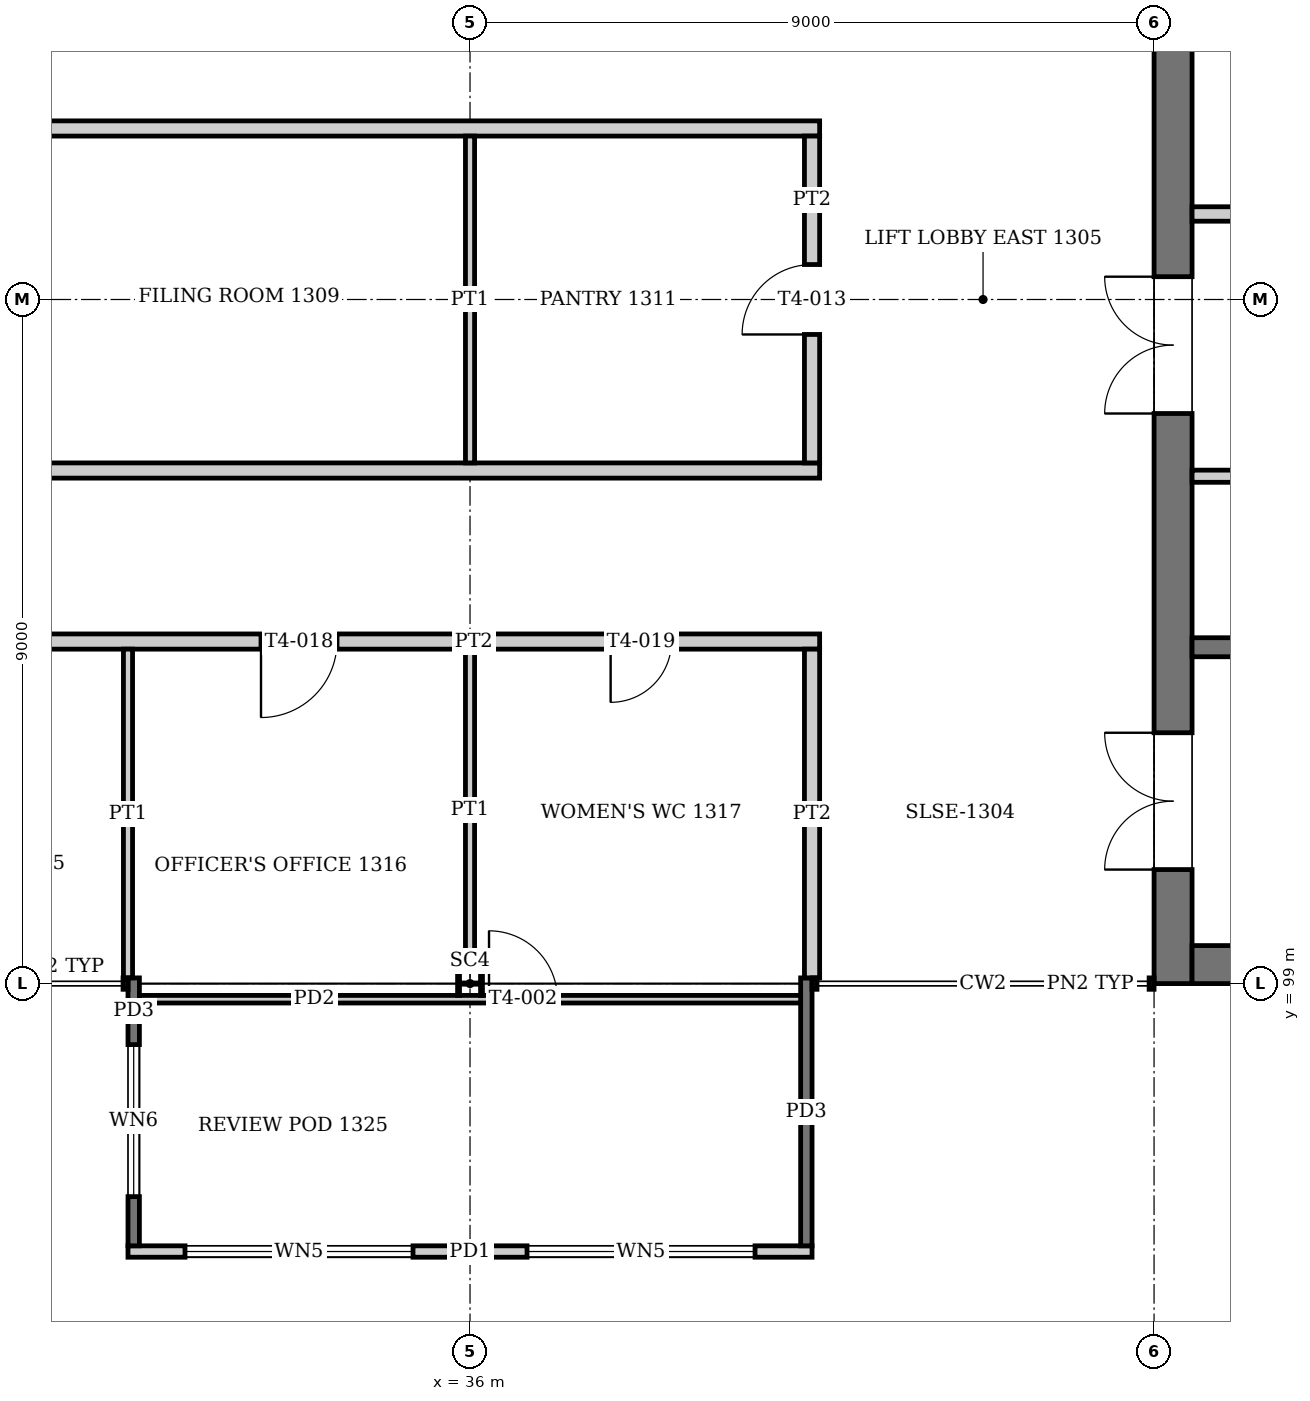
"""IFC4 building model, lengths in metres.
Left out: names, types, materials, properties, quantities, classifications, styles, units other than length and angle.
Written with IfcOpenShell. Run it as: python <this file> out.ifc"""

import sys

from ifc_helpers import new_model, si_unit, direction, frame, frame_2d, origin, origin_2d, place, context, subcontext, project, spatial, rectangle, i_section, extrude, element, fill, save


model = new_model("IFC4")
c1 = context("Model", 3, precision=1e-05, world=origin(), true_north=direction((0.0, 1.0)))
c2 = subcontext(c1, "Body", "Model", "MODEL_VIEW")
j1 = project(units=[si_unit("LENGTHUNIT", "METRE"), si_unit("PLANEANGLEUNIT", "RADIAN")], contexts=[c1])
p1 = place(None, origin())
s1 = spatial("IfcSite", under=j1, at=p1, CompositionType="ELEMENT")
p2 = place(p1, origin())
s2 = spatial("IfcBuilding", under=s1, at=p2, CompositionType="ELEMENT")
p3 = place(p2, frame((0.0, 0.0, 55.2)))
s3 = spatial("IfcBuildingStorey", under=s2, at=p3, CompositionType="ELEMENT", Elevation=55.2)
p4 = place(p3, frame((36.0, 99.0, 0.0), z_axis=(0.0, 0.0, 1.0), x_axis=(0.0, 1.0, 0.0)))
e1 = element("IfcColumn", 1, at=p4, inside=s3, PredefinedType="COLUMN", context=c2, shape_type="SweptSolid", body=[
    extrude(i_section(OverallWidth=0.311, OverallDepth=0.327, WebThickness=0.016, FlangeThickness=0.025, at=origin_2d()), origin(), (0.0, 0.0, 1.0), 4.0),
])
p5 = place(p3, frame((45.25, 99.0, 0.0), z_axis=(0.0, 0.0, 1.0), x_axis=(0.0, 1.0, 0.0)))
e2 = element("IfcWall", 2, at=p5, inside=s3, PredefinedType="SHEAR", context=c2, shape_type="SweptSolid", body=[
    extrude(rectangle(XDim=18.0, YDim=0.5, at=frame_2d((9.0, 0.0))), origin(), (0.0, 0.0, 1.0), 4.0),
])
p6 = place(p5, frame((1.5, 0.0, 0.0)))
e3 = element("IfcOpeningElement", 3, at=p6, cuts=e2, PredefinedType="OPENING", context=c2, shape_type="SweptSolid", body=[
    extrude(rectangle(XDim=1.8, YDim=2.1, at=frame_2d((0.9, 1.05))), frame((0.0, 0.26, 0.0), z_axis=(0.0, -1.0, 0.0), x_axis=(1.0, 0.0, 0.0)), (0.0, 0.0, 1.0), 0.52),
])
p7 = place(p5, frame((14.7, 0.0, 0.0)))
e4 = element("IfcOpeningElement", 4, at=p7, cuts=e2, PredefinedType="OPENING", context=c2, shape_type="SweptSolid", body=[
    extrude(rectangle(XDim=1.8, YDim=2.1, at=frame_2d((0.9, 1.05))), frame((0.0, 0.26, 0.0), z_axis=(0.0, -1.0, 0.0), x_axis=(1.0, 0.0, 0.0)), (0.0, 0.0, 1.0), 0.52),
])
p8 = place(p5, frame((7.5, 0.0, 0.0)))
e5 = element("IfcOpeningElement", 5, at=p8, cuts=e2, PredefinedType="OPENING", context=c2, shape_type="SweptSolid", body=[
    extrude(rectangle(XDim=1.8, YDim=2.1, at=frame_2d((0.9, 1.05))), frame((0.0, 0.26, 0.0), z_axis=(0.0, -1.0, 0.0), x_axis=(1.0, 0.0, 0.0)), (0.0, 0.0, 1.0), 0.52),
])
p9 = place(p3, frame((45.5, 99.25, 0.0), z_axis=(0.0, 0.0, 1.0), x_axis=(1.0, 0.0, 0.0)))
e6 = element("IfcWall", 6, at=p9, inside=s3, PredefinedType="SHEAR", context=c2, shape_type="SweptSolid", body=[
    extrude(rectangle(XDim=8.0, YDim=0.5, at=frame_2d((4.0, 0.0))), origin(), (0.0, 0.0, 1.0), 4.0),
])
p10 = place(p3, frame((31.5, 95.475, 0.0), z_axis=(0.0, 0.0, 1.0), x_axis=(1.0, 0.0, 0.0)))
e7 = element("IfcWall", 7, at=p10, inside=s3, PredefinedType="SOLIDWALL", context=c2, shape_type="SweptSolid", body=[
    extrude(rectangle(XDim=9.0, YDim=0.15, at=frame_2d((4.5, 0.0))), origin(), (0.0, 0.0, 1.0), 2.6),
])
p11 = place(p10, frame((0.75, 0.0, 0.9)))
e8 = element("IfcOpeningElement", 8, at=p11, cuts=e7, PredefinedType="OPENING", context=c2, shape_type="SweptSolid", body=[
    extrude(rectangle(XDim=3.0, YDim=1.4, at=frame_2d((1.5, 0.7))), frame((0.0, 0.085, 0.0), z_axis=(0.0, -1.0, 0.0), x_axis=(1.0, 0.0, 0.0)), (0.0, 0.0, 1.0), 0.17),
])
p12 = place(p10, frame((5.25, 0.0, 0.9)))
e9 = element("IfcOpeningElement", 9, at=p12, cuts=e7, PredefinedType="OPENING", context=c2, shape_type="SweptSolid", body=[
    extrude(rectangle(XDim=3.0, YDim=1.4, at=frame_2d((1.5, 0.7))), frame((0.0, 0.085, 0.0), z_axis=(0.0, -1.0, 0.0), x_axis=(1.0, 0.0, 0.0)), (0.0, 0.0, 1.0), 0.17),
])
p13 = place(p3, frame((31.575, 95.55, -0.15), z_axis=(0.0, 0.0, 1.0), x_axis=(0.0, 1.0, 0.0)))
e10 = element("IfcWall", 10, at=p13, inside=s3, PredefinedType="SOLIDWALL", context=c2, shape_type="SweptSolid", body=[
    extrude(rectangle(XDim=3.525, YDim=0.15, at=frame_2d((1.762, 0.0))), origin(), (0.0, 0.0, 1.0), 2.75),
])
p14 = place(p13, frame((0.647, 0.0, 1.05)))
e11 = element("IfcOpeningElement", 11, at=p14, cuts=e10, PredefinedType="OPENING", context=c2, shape_type="SweptSolid", body=[
    extrude(rectangle(XDim=2.0, YDim=1.4, at=frame_2d((1.0, 0.7))), frame((0.0, 0.085, 0.0), z_axis=(0.0, -1.0, 0.0), x_axis=(1.0, 0.0, 0.0)), (0.0, 0.0, 1.0), 0.17),
])
p15 = place(p3, frame((40.425, 95.55, -0.15), z_axis=(0.0, 0.0, 1.0), x_axis=(0.0, 1.0, 0.0)))
e12 = element("IfcWall", 12, at=p15, inside=s3, PredefinedType="SOLIDWALL", context=c2, shape_type="SweptSolid", body=[
    extrude(rectangle(XDim=3.525, YDim=0.15, at=frame_2d((1.762, 0.0))), origin(), (0.0, 0.0, 1.0), 2.75),
])
p16 = place(p3, frame((31.65, 98.794, 0.0), z_axis=(0.0, 0.0, 1.0), x_axis=(1.0, 0.0, 0.0)))
e13 = element("IfcWall", 13, at=p16, inside=s3, PredefinedType="PARTITIONING", context=c2, shape_type="SweptSolid", body=[
    extrude(rectangle(XDim=8.7, YDim=0.1, at=frame_2d((4.35, 0.0))), origin(), (0.0, 0.0, 1.0), 2.6),
])
p17 = place(p16, frame((4.6, 0.0, 0.0)))
e14 = element("IfcOpeningElement", 14, at=p17, cuts=e13, PredefinedType="OPENING", context=c2, shape_type="SweptSolid", body=[
    extrude(rectangle(XDim=0.9, YDim=2.1, at=frame_2d((0.45, 1.05))), frame((0.0, 0.06, 0.0), z_axis=(0.0, -1.0, 0.0), x_axis=(1.0, 0.0, 0.0)), (0.0, 0.0, 1.0), 0.12),
])
p18 = place(p3, frame((45.5, 103.425, 0.0), z_axis=(0.0, 0.0, 1.0), x_axis=(1.0, 0.0, 0.0)))
e15 = element("IfcWall", 15, at=p18, inside=s3, PredefinedType="SOLIDWALL", context=c2, shape_type="SweptSolid", body=[
    extrude(rectangle(XDim=8.0, YDim=0.25, at=frame_2d((4.0, 0.0))), origin(), (0.0, 0.0, 1.0), 3.75),
])
p19 = place(p3, frame((45.5, 105.675, 0.0), z_axis=(0.0, 0.0, 1.0), x_axis=(1.0, 0.0, 0.0)))
e16 = element("IfcWall", 16, at=p19, inside=s3, PredefinedType="PARTITIONING", context=c2, shape_type="SweptSolid", body=[
    extrude(rectangle(XDim=2.6, YDim=0.16, at=frame_2d((1.3, 0.0))), origin(), (0.0, 0.0, 1.0), 3.75),
])
p20 = place(p19, frame((0.7, 0.0, 0.0)))
e17 = element("IfcOpeningElement", 17, at=p20, cuts=e16, PredefinedType="OPENING", context=c2, shape_type="SweptSolid", body=[
    extrude(rectangle(XDim=1.2, YDim=2.1, at=frame_2d((0.6, 1.05))), frame((0.0, 0.09, 0.0), z_axis=(0.0, -1.0, 0.0), x_axis=(1.0, 0.0, 0.0)), (0.0, 0.0, 1.0), 0.18),
])
p21 = place(p3, frame((45.5, 109.125, 0.0), z_axis=(0.0, 0.0, 1.0), x_axis=(1.0, 0.0, 0.0)))
e18 = element("IfcWall", 18, at=p21, inside=s3, PredefinedType="PARTITIONING", context=c2, shape_type="SweptSolid", body=[
    extrude(rectangle(XDim=2.6, YDim=0.19, at=frame_2d((1.3, 0.0))), origin(), (0.0, 0.0, 1.0), 3.75),
])
p22 = place(p21, frame((0.84, 0.0, 0.0)))
e19 = element("IfcOpeningElement", 19, at=p22, cuts=e18, PredefinedType="OPENING", context=c2, shape_type="SweptSolid", body=[
    extrude(rectangle(XDim=0.92, YDim=2.1, at=frame_2d((0.46, 1.05))), frame((0.0, 0.105, 0.0), z_axis=(0.0, -1.0, 0.0), x_axis=(1.0, 0.0, 0.0)), (0.0, 0.0, 1.0), 0.21),
])
p23 = place(p3, frame((13.4, 103.5, 0.0), z_axis=(0.0, 0.0, 1.0), x_axis=(1.0, 0.0, 0.0)))
e20 = element("IfcWall", 20, at=p23, inside=s3, PredefinedType="PARTITIONING", context=c2, shape_type="SweptSolid", body=[
    extrude(rectangle(XDim=27.2, YDim=0.2, at=frame_2d((13.6, 0.0))), origin(), (0.0, 0.0, 1.0), 3.05),
])
p24 = place(p23, frame((1.85, 0.0, 0.0)))
e21 = element("IfcOpeningElement", 21, at=p24, cuts=e20, PredefinedType="OPENING", context=c2, shape_type="SweptSolid", body=[
    extrude(rectangle(XDim=1.0, YDim=2.1, at=frame_2d((0.5, 1.05))), frame((0.0, 0.11, 0.0), z_axis=(0.0, -1.0, 0.0), x_axis=(1.0, 0.0, 0.0)), (0.0, 0.0, 1.0), 0.22),
])
p25 = place(p23, frame((6.35, 0.0, 0.0)))
e22 = element("IfcOpeningElement", 22, at=p25, cuts=e20, PredefinedType="OPENING", context=c2, shape_type="SweptSolid", body=[
    extrude(rectangle(XDim=1.0, YDim=2.1, at=frame_2d((0.5, 1.05))), frame((0.0, 0.11, 0.0), z_axis=(0.0, -1.0, 0.0), x_axis=(1.0, 0.0, 0.0)), (0.0, 0.0, 1.0), 0.22),
])
p26 = place(p23, frame((10.85, 0.0, 0.0)))
e23 = element("IfcOpeningElement", 23, at=p26, cuts=e20, PredefinedType="OPENING", context=c2, shape_type="SweptSolid", body=[
    extrude(rectangle(XDim=1.0, YDim=2.1, at=frame_2d((0.5, 1.05))), frame((0.0, 0.11, 0.0), z_axis=(0.0, -1.0, 0.0), x_axis=(1.0, 0.0, 0.0)), (0.0, 0.0, 1.0), 0.22),
])
p27 = place(p23, frame((15.35, 0.0, 0.0)))
e24 = element("IfcOpeningElement", 24, at=p27, cuts=e20, PredefinedType="OPENING", context=c2, shape_type="SweptSolid", body=[
    extrude(rectangle(XDim=1.0, YDim=2.1, at=frame_2d((0.5, 1.05))), frame((0.0, 0.11, 0.0), z_axis=(0.0, -1.0, 0.0), x_axis=(1.0, 0.0, 0.0)), (0.0, 0.0, 1.0), 0.22),
])
p28 = place(p23, frame((19.85, 0.0, 0.0)))
e25 = element("IfcOpeningElement", 25, at=p28, cuts=e20, PredefinedType="OPENING", context=c2, shape_type="SweptSolid", body=[
    extrude(rectangle(XDim=1.0, YDim=2.1, at=frame_2d((0.5, 1.05))), frame((0.0, 0.11, 0.0), z_axis=(0.0, -1.0, 0.0), x_axis=(1.0, 0.0, 0.0)), (0.0, 0.0, 1.0), 0.22),
])
p29 = place(p23, frame((24.45, 0.0, 0.0)))
e26 = element("IfcOpeningElement", 26, at=p29, cuts=e20, PredefinedType="OPENING", context=c2, shape_type="SweptSolid", body=[
    extrude(rectangle(XDim=0.8, YDim=2.1, at=frame_2d((0.4, 1.05))), frame((0.0, 0.11, 0.0), z_axis=(0.0, -1.0, 0.0), x_axis=(1.0, 0.0, 0.0)), (0.0, 0.0, 1.0), 0.22),
])
p30 = place(p3, frame((13.4, 105.75, 0.0), z_axis=(0.0, 0.0, 1.0), x_axis=(1.0, 0.0, 0.0)))
e27 = element("IfcWall", 27, at=p30, inside=s3, PredefinedType="PARTITIONING", context=c2, shape_type="SweptSolid", body=[
    extrude(rectangle(XDim=27.2, YDim=0.2, at=frame_2d((13.6, 0.0))), origin(), (0.0, 0.0, 1.0), 3.05),
])
p31 = place(p30, frame((12.9, 0.0, 0.0)))
e28 = element("IfcOpeningElement", 28, at=p31, cuts=e27, PredefinedType="OPENING", context=c2, shape_type="SweptSolid", body=[
    extrude(rectangle(XDim=1.4, YDim=2.1, at=frame_2d((0.7, 1.05))), frame((0.0, 0.11, 0.0), z_axis=(0.0, -1.0, 0.0), x_axis=(1.0, 0.0, 0.0)), (0.0, 0.0, 1.0), 0.22),
])
p32 = place(p3, frame((13.4, 110.25, 0.0), z_axis=(0.0, 0.0, 1.0), x_axis=(1.0, 0.0, 0.0)))
e29 = element("IfcWall", 29, at=p32, inside=s3, PredefinedType="PARTITIONING", context=c2, shape_type="SweptSolid", body=[
    extrude(rectangle(XDim=27.2, YDim=0.2, at=frame_2d((13.6, 0.0))), origin(), (0.0, 0.0, 1.0), 3.05),
])
p33 = place(p32, frame((12.9, 0.0, 0.0)))
e30 = element("IfcOpeningElement", 30, at=p33, cuts=e29, PredefinedType="OPENING", context=c2, shape_type="SweptSolid", body=[
    extrude(rectangle(XDim=1.4, YDim=2.1, at=frame_2d((0.7, 1.05))), frame((0.0, 0.11, 0.0), z_axis=(0.0, -1.0, 0.0), x_axis=(1.0, 0.0, 0.0)), (0.0, 0.0, 1.0), 0.22),
])
p34 = place(p3, frame((31.5, 99.075, 0.0), z_axis=(0.0, 0.0, 1.0), x_axis=(0.0, 1.0, 0.0)))
e31 = element("IfcWall", 31, at=p34, inside=s3, PredefinedType="PARTITIONING", context=c2, shape_type="SweptSolid", body=[
    extrude(rectangle(XDim=4.325, YDim=0.12, at=frame_2d((2.163, 0.0))), origin(), (0.0, 0.0, 1.0), 3.05),
])
p35 = place(p3, frame((36.0, 99.164, 0.0), z_axis=(0.0, 0.0, 1.0), x_axis=(0.0, 1.0, 0.0)))
e32 = element("IfcWall", 32, at=p35, inside=s3, PredefinedType="PARTITIONING", context=c2, shape_type="SweptSolid", body=[
    extrude(rectangle(XDim=4.236, YDim=0.12, at=frame_2d((2.118, 0.0))), origin(), (0.0, 0.0, 1.0), 3.05),
])
p36 = place(p3, frame((36.0, 105.85, 0.0), z_axis=(0.0, 0.0, 1.0), x_axis=(0.0, 1.0, 0.0)))
e33 = element("IfcWall", 33, at=p36, inside=s3, PredefinedType="PARTITIONING", context=c2, shape_type="SweptSolid", body=[
    extrude(rectangle(XDim=4.3, YDim=0.12, at=frame_2d((2.15, 0.0))), origin(), (0.0, 0.0, 1.0), 3.05),
])
p37 = place(p3, frame((40.5, 99.075, 0.0), z_axis=(0.0, 0.0, 1.0), x_axis=(0.0, 1.0, 0.0)))
e34 = element("IfcWall", 34, at=p37, inside=s3, PredefinedType="PARTITIONING", context=c2, shape_type="SweptSolid", body=[
    extrude(rectangle(XDim=4.325, YDim=0.2, at=frame_2d((2.163, 0.0))), origin(), (0.0, 0.0, 1.0), 3.05),
])
p38 = place(p3, frame((40.5, 105.85, 0.0), z_axis=(0.0, 0.0, 1.0), x_axis=(0.0, 1.0, 0.0)))
e35 = element("IfcWall", 35, at=p38, inside=s3, PredefinedType="PARTITIONING", context=c2, shape_type="SweptSolid", body=[
    extrude(rectangle(XDim=4.3, YDim=0.2, at=frame_2d((2.15, 0.0))), origin(), (0.0, 0.0, 1.0), 3.05),
])
p39 = place(p38, frame((1.69, 0.0, 0.0)))
e36 = element("IfcOpeningElement", 36, at=p39, cuts=e35, PredefinedType="OPENING", context=c2, shape_type="SweptSolid", body=[
    extrude(rectangle(XDim=0.92, YDim=2.1, at=frame_2d((0.46, 1.05))), frame((0.0, 0.11, 0.0), z_axis=(0.0, -1.0, 0.0), x_axis=(1.0, 0.0, 0.0)), (0.0, 0.0, 1.0), 0.22),
])
p40 = place(p11, origin())
e37 = element("IfcWindow", 37, at=p40, inside=s3, PartitioningType="SINGLE_PANEL", PredefinedType="WINDOW", context=c2, shape_type="SweptSolid", body=[
    extrude(rectangle(XDim=3.0, YDim=1.4, at=frame_2d((1.5, 0.7))), frame((0.0, 0.03, 0.0), z_axis=(0.0, -1.0, 0.0), x_axis=(1.0, 0.0, 0.0)), (0.0, 0.0, 1.0), 0.06),
])
fill(e8, e37)
p41 = place(p12, origin())
e38 = element("IfcWindow", 38, at=p41, inside=s3, PartitioningType="SINGLE_PANEL", PredefinedType="WINDOW", context=c2, shape_type="SweptSolid", body=[
    extrude(rectangle(XDim=3.0, YDim=1.4, at=frame_2d((1.5, 0.7))), frame((0.0, 0.03, 0.0), z_axis=(0.0, -1.0, 0.0), x_axis=(1.0, 0.0, 0.0)), (0.0, 0.0, 1.0), 0.06),
])
fill(e9, e38)
p42 = place(p14, origin())
e39 = element("IfcWindow", 39, at=p42, inside=s3, PartitioningType="SINGLE_PANEL", PredefinedType="WINDOW", context=c2, shape_type="SweptSolid", body=[
    extrude(rectangle(XDim=2.0, YDim=1.4, at=frame_2d((1.0, 0.7))), frame((0.0, 0.03, 0.0), z_axis=(0.0, -1.0, 0.0), x_axis=(1.0, 0.0, 0.0)), (0.0, 0.0, 1.0), 0.06),
])
fill(e11, e39)
p43 = place(p17, origin())
e40 = element("IfcDoor", 40, at=p43, inside=s3, OperationType="SINGLE_SWING_LEFT", PredefinedType="DOOR", context=c2, shape_type="SweptSolid", body=[
    extrude(rectangle(XDim=0.9, YDim=2.1, at=frame_2d((0.45, 1.05))), frame((0.0, 0.025, 0.0), z_axis=(0.0, -1.0, 0.0), x_axis=(1.0, 0.0, 0.0)), (0.0, 0.0, 1.0), 0.05),
])
fill(e14, e40)
p44 = place(p39, origin())
e41 = element("IfcDoor", 41, at=p44, inside=s3, OperationType="SINGLE_SWING_LEFT", PredefinedType="DOOR", context=c2, shape_type="SweptSolid", body=[
    extrude(rectangle(XDim=0.92, YDim=2.1, at=frame_2d((0.46, 1.05))), frame((0.0, 0.025, 0.0), z_axis=(0.0, -1.0, 0.0), x_axis=(1.0, 0.0, 0.0)), (0.0, 0.0, 1.0), 0.05),
])
fill(e36, e41)
p45 = place(p28, frame((1.0, 0.0, 0.0), z_axis=(0.0, 0.0, 1.0), x_axis=(-1.0, 0.0, 0.0)))
e42 = element("IfcDoor", 42, at=p45, inside=s3, OperationType="SINGLE_SWING_RIGHT", PredefinedType="DOOR", context=c2, shape_type="SweptSolid", body=[
    extrude(rectangle(XDim=1.0, YDim=2.1, at=frame_2d((0.5, 1.05))), frame((0.0, 0.025, 0.0), z_axis=(0.0, -1.0, 0.0), x_axis=(1.0, 0.0, 0.0)), (0.0, 0.0, 1.0), 0.05),
])
fill(e25, e42)
p46 = place(p29, frame((0.8, 0.0, 0.0), z_axis=(0.0, 0.0, 1.0), x_axis=(-1.0, 0.0, 0.0)))
e43 = element("IfcDoor", 43, at=p46, inside=s3, OperationType="SINGLE_SWING_RIGHT", PredefinedType="DOOR", context=c2, shape_type="SweptSolid", body=[
    extrude(rectangle(XDim=0.8, YDim=2.1, at=frame_2d((0.4, 1.05))), frame((0.0, 0.025, 0.0), z_axis=(0.0, -1.0, 0.0), x_axis=(1.0, 0.0, 0.0)), (0.0, 0.0, 1.0), 0.05),
])
fill(e26, e43)
p47 = place(p6, origin())
e44 = element("IfcDoor", 44, at=p47, inside=s3, OperationType="DOUBLE_DOOR_SINGLE_SWING", PredefinedType="DOOR", context=c2, shape_type="SweptSolid", body=[
    extrude(rectangle(XDim=1.8, YDim=2.1, at=frame_2d((0.9, 1.05))), frame((0.0, 0.025, 0.0), z_axis=(0.0, -1.0, 0.0), x_axis=(1.0, 0.0, 0.0)), (0.0, 0.0, 1.0), 0.05),
])
fill(e3, e44)
p48 = place(p8, origin())
e45 = element("IfcDoor", 45, at=p48, inside=s3, OperationType="DOUBLE_DOOR_SINGLE_SWING", PredefinedType="DOOR", context=c2, shape_type="SweptSolid", body=[
    extrude(rectangle(XDim=1.8, YDim=2.1, at=frame_2d((0.9, 1.05))), frame((0.0, 0.025, 0.0), z_axis=(0.0, -1.0, 0.0), x_axis=(1.0, 0.0, 0.0)), (0.0, 0.0, 1.0), 0.05),
])
fill(e5, e45)
save(model, sys.argv[1])
